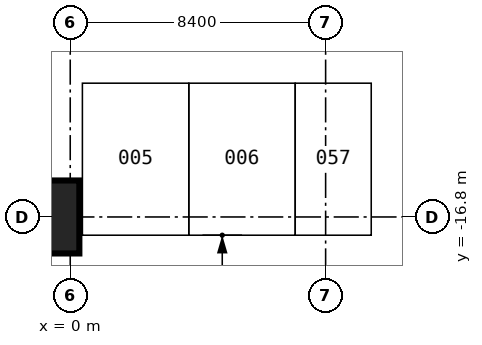
"""IFC4 building model, lengths in metres.
Left out: names, types, materials, properties, quantities, classifications, styles, units other than length and angle.
Written with IfcOpenShell. Run it as: python <this file> out.ifc"""

import sys

from ifc_helpers import new_model, si_unit, direction, frame, origin, origin_2d, place, context, subcontext, project, spatial, rectangle, extrude, element, save


model = new_model("IFC4")
c1 = context("Model", 3, precision=1e-05, world=origin(), true_north=direction((0.0, 1.0)))
c2 = subcontext(c1, "Body", "Model", "MODEL_VIEW")
j1 = project(units=[si_unit("LENGTHUNIT", "METRE"), si_unit("PLANEANGLEUNIT", "RADIAN")], contexts=[c1])
p1 = place(None, origin())
s1 = spatial("IfcSite", under=j1, at=p1, CompositionType="ELEMENT")
p2 = place(p1, origin())
s2 = spatial("IfcBuilding", under=s1, at=p2, CompositionType="ELEMENT")
p3 = place(p2, frame((0.0, 0.0, -9.0)))
s3 = spatial("IfcBuildingStorey", under=s2, at=p3, CompositionType="ELEMENT", Elevation=-9.0)
p4 = place(p3, frame((-0.9, -16.8, 0.0), z_axis=(0.0, 0.0, 1.0), x_axis=(1.0, 0.0, 0.0)))
e1 = element("IfcColumn", 1, at=p4, inside=s3, PredefinedType="COLUMN", context=c2, shape_type="SweptSolid", body=[
    extrude(rectangle(XDim=2.4, YDim=2.4, at=origin_2d()), origin(), (0.0, 0.0, 1.0), 4.5),
])
save(model, sys.argv[1])
